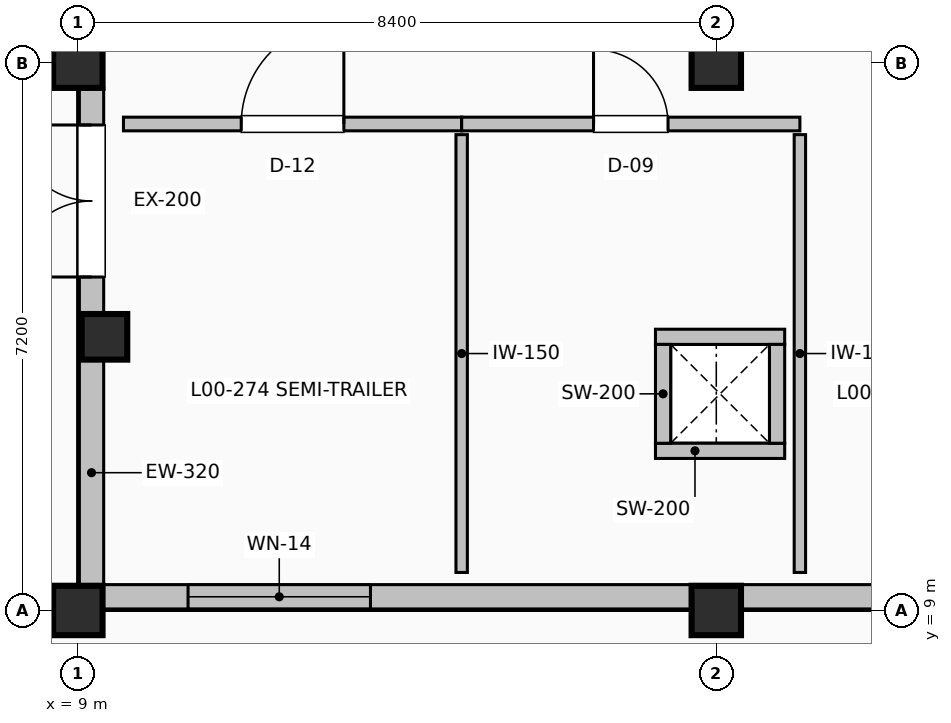
"""IFC4 building model, lengths in metres.
Left out: names, types, materials, properties, quantities, classifications, styles, units other than length and angle.
Written with IfcOpenShell. Run it as: python <this file> out.ifc"""

import sys

from ifc_helpers import new_model, si_unit, direction, frame, frame_2d, origin, origin_2d, place, context, subcontext, project, spatial, rectangle, extrude, element, fill, save


model = new_model("IFC4")
c1 = context("Model", 3, precision=1e-05, world=origin(), true_north=direction((0.0, 1.0)))
c2 = subcontext(c1, "Body", "Model", "MODEL_VIEW")
j1 = project(units=[si_unit("LENGTHUNIT", "METRE"), si_unit("PLANEANGLEUNIT", "RADIAN")], contexts=[c1])
p1 = place(None, origin())
s1 = spatial("IfcSite", under=j1, at=p1, CompositionType="ELEMENT")
p2 = place(p1, origin())
s2 = spatial("IfcBuilding", under=s1, at=p2, CompositionType="ELEMENT")
p3 = place(p2, origin())
s3 = spatial("IfcBuildingStorey", under=s2, at=p3, CompositionType="ELEMENT", Elevation=0.0)
for number, where, z_axis, x_axis in (
    (1, (9.0, 9.0, 0.0), (0.0, 0.0, 1.0), (1.0, 0.0, 0.0)),
    (2, (9.0, 16.2, 0.0), (0.0, 0.0, 1.0), (1.0, 0.0, 0.0)),
    (3, (17.4, 9.0, 0.0), (0.0, 0.0, 1.0), (1.0, 0.0, 0.0)),
    (4, (17.4, 16.2, 0.0), (0.0, 0.0, 1.0), (1.0, 0.0, 0.0)),
):
    element("IfcColumn", number, at=place(p3, frame(where, z_axis=z_axis, x_axis=x_axis)), inside=s3, PredefinedType="COLUMN", context=c2, shape_type="SweptSolid", body=[
        extrude(rectangle(XDim=0.65, YDim=0.65, at=origin_2d()), origin(), (0.0, 0.0, 1.0), 5.4),
    ])
p4 = place(p3, frame((9.35, 12.6, 0.0), z_axis=(0.0, 0.0, 1.0), x_axis=(1.0, 0.0, 0.0)))
e5 = element("IfcColumn", 5, at=p4, inside=s3, PredefinedType="PILASTER", context=c2, shape_type="SweptSolid", body=[
    extrude(rectangle(XDim=0.6, YDim=0.6, at=origin_2d()), origin(), (0.0, 0.0, 1.0), 5.4),
])
p5 = place(p3, frame((9.18, 9.325, 0.0), z_axis=(0.0, 0.0, 1.0), x_axis=(0.0, 1.0, 0.0)))
e6 = element("IfcWall", 6, at=p5, inside=s3, PredefinedType="SOLIDWALL", context=c2, shape_type="SweptSolid", body=[
    extrude(rectangle(XDim=2.975, YDim=0.32, at=frame_2d((1.488, 0.0))), origin(), (0.0, 0.0, 1.0), 4.342),
])
p6 = place(p3, frame((9.18, 12.9, 0.0), z_axis=(0.0, 0.0, 1.0), x_axis=(0.0, 1.0, 0.0)))
e7 = element("IfcWall", 7, at=p6, inside=s3, PredefinedType="SOLIDWALL", context=c2, shape_type="SweptSolid", body=[
    extrude(rectangle(XDim=2.975, YDim=0.32, at=frame_2d((1.488, 0.0))), origin(), (0.0, 0.0, 1.0), 4.342),
])
p7 = place(p6, frame((0.487, 0.0, 0.0)))
e8 = element("IfcOpeningElement", 8, at=p7, cuts=e7, PredefinedType="OPENING", context=c2, shape_type="SweptSolid", body=[
    extrude(rectangle(XDim=2.0, YDim=2.4, at=frame_2d((1.0, 1.2))), frame((0.0, 0.17, 0.0), z_axis=(0.0, -1.0, 0.0), x_axis=(1.0, 0.0, 0.0)), (0.0, 0.0, 1.0), 0.34),
])
p8 = place(p3, frame((25.475, 9.18, 0.0), z_axis=(0.0, 0.0, 1.0), x_axis=(-1.0, 0.0, 0.0)))
e9 = element("IfcWall", 9, at=p8, inside=s3, PredefinedType="SOLIDWALL", context=c2, shape_type="SweptSolid", body=[
    extrude(rectangle(XDim=7.75, YDim=0.32, at=frame_2d((3.875, 0.0))), origin(), (0.0, 0.0, 1.0), 4.192),
])
p9 = place(p8, frame((2.875, 0.0, 0.0)))
e10 = element("IfcOpeningElement", 10, at=p9, cuts=e9, PredefinedType="OPENING", context=c2, shape_type="SweptSolid", body=[
    extrude(rectangle(XDim=2.0, YDim=2.4, at=frame_2d((1.0, 1.2))), frame((0.0, 0.17, 0.0), z_axis=(0.0, -1.0, 0.0), x_axis=(1.0, 0.0, 0.0)), (0.0, 0.0, 1.0), 0.34),
])
p10 = place(p3, frame((17.075, 9.18, 0.0), z_axis=(0.0, 0.0, 1.0), x_axis=(-1.0, 0.0, 0.0)))
e11 = element("IfcWall", 11, at=p10, inside=s3, PredefinedType="SOLIDWALL", context=c2, shape_type="SweptSolid", body=[
    extrude(rectangle(XDim=7.75, YDim=0.32, at=frame_2d((3.875, 0.0))), origin(), (0.0, 0.0, 1.0), 4.192),
])
p11 = place(p10, frame((4.225, 0.0, 0.95)))
e12 = element("IfcOpeningElement", 12, at=p11, cuts=e11, PredefinedType="OPENING", context=c2, shape_type="SweptSolid", body=[
    extrude(rectangle(XDim=2.4, YDim=1.9, at=frame_2d((1.2, 0.95))), frame((0.0, 0.17, 0.0), z_axis=(0.0, -1.0, 0.0), x_axis=(1.0, 0.0, 0.0)), (0.0, 0.0, 1.0), 0.34),
])
for number, where, z_axis, x_axis in (
    (13, (16.6, 11.1, 0.0), (0.0, 0.0, 1.0), (1.0, 0.0, 0.0)),
    (14, (18.3, 12.6, 0.0), (0.0, 0.0, 1.0), (-1.0, 0.0, 0.0)),
):
    element("IfcWall", number, at=place(p3, frame(where, z_axis=z_axis, x_axis=x_axis)), inside=s3, PredefinedType="PARTITIONING", context=c2, shape_type="SweptSolid", body=[
        extrude(rectangle(XDim=1.7, YDim=0.2, at=frame_2d((0.85, 0.0))), origin(), (0.0, 0.0, 1.0), 5.1),
    ])
for number, where, z_axis, x_axis in (
    (15, (16.7, 11.2, 0.0), (0.0, 0.0, 1.0), (0.0, 1.0, 0.0)),
    (16, (18.2, 12.5, 0.0), (0.0, 0.0, 1.0), (0.0, -1.0, 0.0)),
):
    element("IfcWall", number, at=place(p3, frame(where, z_axis=z_axis, x_axis=x_axis)), inside=s3, PredefinedType="PARTITIONING", context=c2, shape_type="SweptSolid", body=[
        extrude(rectangle(XDim=1.3, YDim=0.2, at=frame_2d((0.65, 0.0))), origin(), (0.0, 0.0, 1.0), 5.1),
    ])
p12 = place(p3, frame((9.6, 15.4, 0.0), z_axis=(0.0, 0.0, 1.0), x_axis=(1.0, 0.0, 0.0)))
e17 = element("IfcWall", 17, at=p12, inside=s3, PredefinedType="PARTITIONING", context=c2, shape_type="SweptSolid", body=[
    extrude(rectangle(XDim=4.45, YDim=0.18, at=frame_2d((2.225, 0.0))), origin(), (0.0, 0.0, 1.0), 5.092),
])
p13 = place(p12, frame((1.55, 0.0, 0.0)))
e18 = element("IfcOpeningElement", 18, at=p13, cuts=e17, PredefinedType="OPENING", context=c2, shape_type="SweptSolid", body=[
    extrude(rectangle(XDim=1.35, YDim=2.16, at=frame_2d((0.675, 1.08))), frame((0.0, 0.1, 0.0), z_axis=(0.0, -1.0, 0.0), x_axis=(1.0, 0.0, 0.0)), (0.0, 0.0, 1.0), 0.2),
])
for number, where, z_axis, x_axis in (
    (19, (14.05, 9.5, 0.0), (0.0, 0.0, 1.0), (0.0, 1.0, 0.0)),
    (20, (18.5, 9.5, 0.0), (0.0, 0.0, 1.0), (0.0, 1.0, 0.0)),
):
    element("IfcWall", number, at=place(p3, frame(where, z_axis=z_axis, x_axis=x_axis)), inside=s3, PredefinedType="PARTITIONING", context=c2, shape_type="SweptSolid", body=[
        extrude(rectangle(XDim=5.76, YDim=0.15, at=frame_2d((2.88, 0.0))), origin(), (0.0, 0.0, 1.0), 5.092),
    ])
p14 = place(p3, frame((14.05, 15.4, 0.0), z_axis=(0.0, 0.0, 1.0), x_axis=(1.0, 0.0, 0.0)))
e21 = element("IfcWall", 21, at=p14, inside=s3, PredefinedType="PARTITIONING", context=c2, shape_type="SweptSolid", body=[
    extrude(rectangle(XDim=4.45, YDim=0.18, at=frame_2d((2.225, 0.0))), origin(), (0.0, 0.0, 1.0), 5.092),
])
p15 = place(p14, frame((1.735, 0.0, 0.0)))
e22 = element("IfcOpeningElement", 22, at=p15, cuts=e21, PredefinedType="OPENING", context=c2, shape_type="SweptSolid", body=[
    extrude(rectangle(XDim=0.98, YDim=2.08, at=frame_2d((0.49, 1.04))), frame((0.0, 0.1, 0.0), z_axis=(0.0, -1.0, 0.0), x_axis=(1.0, 0.0, 0.0)), (0.0, 0.0, 1.0), 0.2),
])
p16 = place(p7, origin())
e23 = element("IfcDoor", 23, at=p16, inside=s3, OperationType="DOUBLE_DOOR_SINGLE_SWING", PredefinedType="DOOR", context=c2, shape_type="SweptSolid", body=[
    extrude(rectangle(XDim=2.0, YDim=2.4, at=frame_2d((1.0, 1.2))), frame((0.0, 0.025, 0.0), z_axis=(0.0, -1.0, 0.0), x_axis=(1.0, 0.0, 0.0)), (0.0, 0.0, 1.0), 0.05),
])
fill(e8, e23)
p17 = place(p11, origin())
e24 = element("IfcWindow", 24, at=p17, inside=s3, PartitioningType="SINGLE_PANEL", PredefinedType="WINDOW", context=c2, shape_type="SweptSolid", body=[
    extrude(rectangle(XDim=2.4, YDim=1.9, at=frame_2d((1.2, 0.95))), frame((0.0, 0.03, 0.0), z_axis=(0.0, -1.0, 0.0), x_axis=(1.0, 0.0, 0.0)), (0.0, 0.0, 1.0), 0.06),
])
fill(e12, e24)
p18 = place(p13, origin())
e25 = element("IfcDoor", 25, at=p18, inside=s3, OperationType="SINGLE_SWING_RIGHT", PredefinedType="DOOR", context=c2, shape_type="SweptSolid", body=[
    extrude(rectangle(XDim=1.35, YDim=2.16, at=frame_2d((0.675, 1.08))), frame((0.0, 0.025, 0.0), z_axis=(0.0, -1.0, 0.0), x_axis=(1.0, 0.0, 0.0)), (0.0, 0.0, 1.0), 0.05),
])
fill(e18, e25)
p19 = place(p15, origin())
e26 = element("IfcDoor", 26, at=p19, inside=s3, OperationType="SINGLE_SWING_LEFT", PredefinedType="DOOR", context=c2, shape_type="SweptSolid", body=[
    extrude(rectangle(XDim=0.98, YDim=2.08, at=frame_2d((0.49, 1.04))), frame((0.0, 0.025, 0.0), z_axis=(0.0, -1.0, 0.0), x_axis=(1.0, 0.0, 0.0)), (0.0, 0.0, 1.0), 0.05),
])
fill(e22, e26)
save(model, sys.argv[1])
